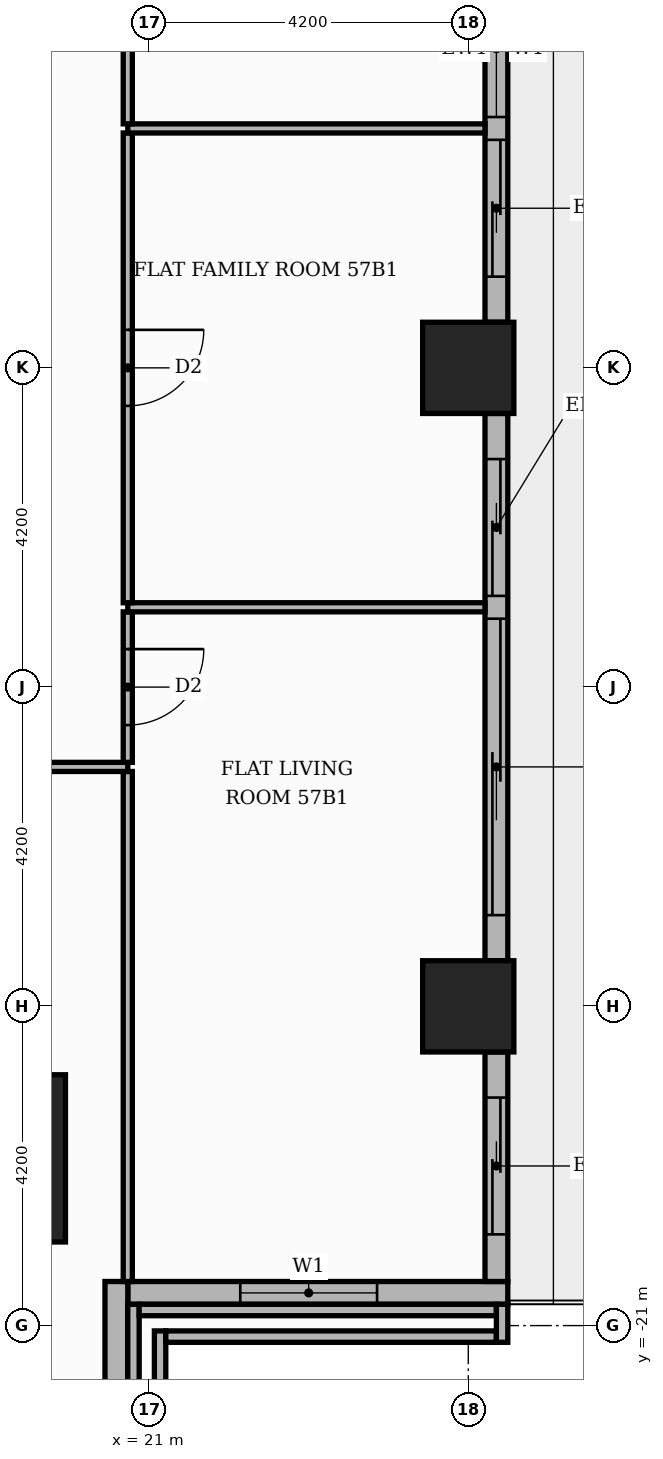
"""IFC4 building model, lengths in metres.
Left out: names, types, materials, properties, quantities, classifications, styles, units other than length and angle.
Written with IfcOpenShell. Run it as: python <this file> out.ifc"""

import sys

from ifc_helpers import new_model, si_unit, direction, frame, frame_2d, origin, origin_2d, place, context, subcontext, project, spatial, rectangle, extrude, element, fill, save


model = new_model("IFC4")
c1 = context("Model", 3, precision=1e-05, world=origin(), true_north=direction((0.0, 1.0)))
c2 = subcontext(c1, "Body", "Model", "MODEL_VIEW")
j1 = project(units=[si_unit("LENGTHUNIT", "METRE"), si_unit("PLANEANGLEUNIT", "RADIAN")], contexts=[c1])
p1 = place(None, origin())
s1 = spatial("IfcSite", under=j1, at=p1, CompositionType="ELEMENT")
p2 = place(p1, origin())
s2 = spatial("IfcBuilding", under=s1, at=p2, CompositionType="ELEMENT")
p3 = place(p2, frame((0.0, 0.0, 240.6)))
s3 = spatial("IfcBuildingStorey", under=s2, at=p3, CompositionType="ELEMENT", Elevation=240.6)
p4 = place(p3, frame((18.8, -18.8, 0.0), z_axis=(0.0, 0.0, 1.0), x_axis=(1.0, 0.0, 0.0)))
e1 = element("IfcColumn", 1, at=p4, inside=s3, PredefinedType="COLUMN", context=c2, shape_type="SweptSolid", body=[
    extrude(rectangle(XDim=2.2, YDim=2.2, at=origin_2d()), origin(), (0.0, 0.0, 1.0), 3.9),
])
p5 = place(p3, frame((25.2, -8.4, -0.42), z_axis=(0.0, 0.0, 1.0), x_axis=(1.0, 0.0, 0.0)))
e2 = element("IfcColumn", 2, at=p5, inside=s3, PredefinedType="COLUMN", context=c2, shape_type="SweptSolid", body=[
    extrude(rectangle(XDim=1.2, YDim=1.2, at=origin_2d()), origin(), (0.0, 0.0, 1.0), 4.32),
])
p6 = place(p3, frame((25.2, -16.8, 0.0), z_axis=(0.0, 0.0, 1.0), x_axis=(1.0, 0.0, 0.0)))
e3 = element("IfcColumn", 3, at=p6, inside=s3, PredefinedType="COLUMN", context=c2, shape_type="SweptSolid", body=[
    extrude(rectangle(XDim=1.2, YDim=1.2, at=origin_2d()), origin(), (0.0, 0.0, 1.0), 3.9),
])
p7 = place(p3, frame((20.72, -20.57, 0.0), z_axis=(0.0, 0.0, 1.0), x_axis=(1.0, 0.0, 0.0)))
e4 = element("IfcWall", 4, at=p7, inside=s3, PredefinedType="STANDARD", context=c2, shape_type="SweptSolid", body=[
    extrude(rectangle(XDim=5.0, YDim=0.3, at=frame_2d((2.5, 0.0))), origin(), (0.0, 0.0, 1.0), 3.48),
])
p8 = place(p7, frame((1.48, 0.0, 0.9)))
e5 = element("IfcOpeningElement", 5, at=p8, cuts=e4, PredefinedType="OPENING", context=c2, shape_type="SweptSolid", body=[
    extrude(rectangle(XDim=1.8, YDim=2.1, at=frame_2d((0.9, 1.05))), frame((0.0, 0.16, 0.0), z_axis=(0.0, -1.0, 0.0), x_axis=(1.0, 0.0, 0.0)), (0.0, 0.0, 1.0), 0.32),
])
p9 = place(p3, frame((25.57, -20.42, 0.0), z_axis=(0.0, 0.0, 1.0), x_axis=(0.0, 1.0, 0.0)))
e6 = element("IfcWall", 6, at=p9, inside=s3, PredefinedType="STANDARD", context=c2, shape_type="SweptSolid", body=[
    extrude(rectangle(XDim=3.02, YDim=0.3, at=frame_2d((1.51, 0.0))), origin(), (0.0, 0.0, 1.0), 3.48),
])
p10 = place(p9, frame((0.62, 0.0, 0.0)))
e7 = element("IfcOpeningElement", 7, at=p10, cuts=e6, PredefinedType="OPENING", context=c2, shape_type="SweptSolid", body=[
    extrude(rectangle(XDim=1.8, YDim=2.4, at=frame_2d((0.9, 1.2))), frame((0.0, 0.16, 0.0), z_axis=(0.0, -1.0, 0.0), x_axis=(1.0, 0.0, 0.0)), (0.0, 0.0, 1.0), 0.32),
])
p11 = place(p3, frame((25.57, -16.2, 0.0), z_axis=(0.0, 0.0, 1.0), x_axis=(0.0, 1.0, 0.0)))
e8 = element("IfcWall", 8, at=p11, inside=s3, PredefinedType="STANDARD", context=c2, shape_type="SweptSolid", body=[
    extrude(rectangle(XDim=7.2, YDim=0.3, at=frame_2d((3.6, 0.0))), origin(), (0.0, 0.0, 1.0), 3.48),
])
p12 = place(p11, frame((0.6, 0.0, 0.0)))
e9 = element("IfcOpeningElement", 9, at=p12, cuts=e8, PredefinedType="OPENING", context=c2, shape_type="SweptSolid", body=[
    extrude(rectangle(XDim=3.9, YDim=2.4, at=frame_2d((1.95, 1.2))), frame((0.0, 0.16, 0.0), z_axis=(0.0, -1.0, 0.0), x_axis=(1.0, 0.0, 0.0)), (0.0, 0.0, 1.0), 0.32),
])
p13 = place(p11, frame((4.8, 0.0, 0.0)))
e10 = element("IfcOpeningElement", 10, at=p13, cuts=e8, PredefinedType="OPENING", context=c2, shape_type="SweptSolid", body=[
    extrude(rectangle(XDim=1.8, YDim=2.4, at=frame_2d((0.9, 1.2))), frame((0.0, 0.16, 0.0), z_axis=(0.0, -1.0, 0.0), x_axis=(1.0, 0.0, 0.0)), (0.0, 0.0, 1.0), 0.32),
])
p14 = place(p3, frame((25.57, -7.8, 0.0), z_axis=(0.0, 0.0, 1.0), x_axis=(0.0, 1.0, 0.0)))
e11 = element("IfcWall", 11, at=p14, inside=s3, PredefinedType="STANDARD", context=c2, shape_type="SweptSolid", body=[
    extrude(rectangle(XDim=7.2, YDim=0.3, at=frame_2d((3.6, 0.0))), origin(), (0.0, 0.0, 1.0), 3.48),
])
p15 = place(p14, frame((0.6, 0.0, 0.0)))
e12 = element("IfcOpeningElement", 12, at=p15, cuts=e11, PredefinedType="OPENING", context=c2, shape_type="SweptSolid", body=[
    extrude(rectangle(XDim=1.8, YDim=2.4, at=frame_2d((0.9, 1.2))), frame((0.0, 0.16, 0.0), z_axis=(0.0, -1.0, 0.0), x_axis=(1.0, 0.0, 0.0)), (0.0, 0.0, 1.0), 0.32),
])
p16 = place(p14, frame((2.7, 0.0, 0.9)))
e13 = element("IfcOpeningElement", 13, at=p16, cuts=e11, PredefinedType="OPENING", context=c2, shape_type="SweptSolid", body=[
    extrude(rectangle(XDim=1.8, YDim=2.1, at=frame_2d((0.9, 1.05))), frame((0.0, 0.16, 0.0), z_axis=(0.0, -1.0, 0.0), x_axis=(1.0, 0.0, 0.0)), (0.0, 0.0, 1.0), 0.32),
])
p17 = place(p14, frame((4.8, 0.0, 0.0)))
e14 = element("IfcOpeningElement", 14, at=p17, cuts=e11, PredefinedType="OPENING", context=c2, shape_type="SweptSolid", body=[
    extrude(rectangle(XDim=1.8, YDim=2.4, at=frame_2d((0.9, 1.2))), frame((0.0, 0.16, 0.0), z_axis=(0.0, -1.0, 0.0), x_axis=(1.0, 0.0, 0.0)), (0.0, 0.0, 1.0), 0.32),
])
p18 = place(p3, frame((20.57, -25.42, 0.0), z_axis=(0.0, 0.0, 1.0), x_axis=(0.0, 1.0, 0.0)))
e15 = element("IfcWall", 15, at=p18, inside=s3, PredefinedType="STANDARD", context=c2, shape_type="SweptSolid", body=[
    extrude(rectangle(XDim=5.0, YDim=0.3, at=frame_2d((2.5, 0.0))), origin(), (0.0, 0.0, 1.0), 3.48),
])
p19 = place(p18, frame((1.42, 0.0, 0.9)))
e16 = element("IfcOpeningElement", 16, at=p19, cuts=e15, PredefinedType="OPENING", context=c2, shape_type="SweptSolid", body=[
    extrude(rectangle(XDim=1.8, YDim=2.1, at=frame_2d((0.9, 1.05))), frame((0.0, 0.16, 0.0), z_axis=(0.0, -1.0, 0.0), x_axis=(1.0, 0.0, 0.0)), (0.0, 0.0, 1.0), 0.32),
])
p20 = place(p3, frame((20.795, -25.72, 0.0), z_axis=(0.0, 0.0, 1.0), x_axis=(0.0, 1.0, 0.0)))
e17 = element("IfcWall", 17, at=p20, inside=s3, PredefinedType="PARAPET", context=c2, shape_type="SweptSolid", body=[
    extrude(rectangle(XDim=5.0, YDim=0.15, at=frame_2d((2.5, 0.0))), origin(), (0.0, 0.0, 1.0), 1.1),
])
p21 = place(p3, frame((20.87, -20.795, 0.0), z_axis=(0.0, 0.0, 1.0), x_axis=(1.0, 0.0, 0.0)))
e18 = element("IfcWall", 18, at=p21, inside=s3, PredefinedType="PARAPET", context=c2, shape_type="SweptSolid", body=[
    extrude(rectangle(XDim=4.7, YDim=0.15, at=frame_2d((2.35, 0.0))), origin(), (0.0, 0.0, 1.0), 1.1),
])
p22 = place(p3, frame((21.145, -25.72, 0.0), z_axis=(0.0, 0.0, 1.0), x_axis=(0.0, 1.0, 0.0)))
e19 = element("IfcWall", 19, at=p22, inside=s3, PredefinedType="PARAPET", context=c2, shape_type="SweptSolid", body=[
    extrude(rectangle(XDim=4.65, YDim=0.15, at=frame_2d((2.325, 0.0))), origin(), (0.0, 0.0, 1.0), 1.1),
])
p23 = place(p3, frame((21.22, -21.145, 0.0), z_axis=(0.0, 0.0, 1.0), x_axis=(1.0, 0.0, 0.0)))
e20 = element("IfcWall", 20, at=p23, inside=s3, PredefinedType="PARAPET", context=c2, shape_type="SweptSolid", body=[
    extrude(rectangle(XDim=4.35, YDim=0.15, at=frame_2d((2.175, 0.0))), origin(), (0.0, 0.0, 1.0), 1.1),
])
p24 = place(p3, frame((25.645, -21.22, 0.0), z_axis=(0.0, 0.0, 1.0), x_axis=(0.0, 1.0, 0.0)))
e21 = element("IfcWall", 21, at=p24, inside=s3, PredefinedType="PARAPET", context=c2, shape_type="SweptSolid", body=[
    extrude(rectangle(XDim=0.5, YDim=0.15, at=frame_2d((0.25, 0.0))), origin(), (0.0, 0.0, 1.0), 1.1),
])
p25 = place(p3, frame((20.72, -20.42, 0.0), z_axis=(0.0, 0.0, 1.0), x_axis=(0.0, 1.0, 0.0)))
e22 = element("IfcWall", 22, at=p25, inside=s3, PredefinedType="PARTITIONING", context=c2, shape_type="SweptSolid", body=[
    extrude(rectangle(XDim=6.71, YDim=0.12, at=frame_2d((3.355, 0.0))), origin(), (0.0, 0.0, 1.0), 3.48),
])
p26 = place(p3, frame((13.65, -13.65, 0.0), z_axis=(0.0, 0.0, 1.0), x_axis=(1.0, 0.0, 0.0)))
e23 = element("IfcWall", 23, at=p26, inside=s3, PredefinedType="PARTITIONING", context=c2, shape_type="SweptSolid", body=[
    extrude(rectangle(XDim=7.07, YDim=0.12, at=frame_2d((3.535, 0.0))), origin(), (0.0, 0.0, 1.0), 3.48),
])
p27 = place(p26, frame((3.085, 0.0, 0.0)))
e24 = element("IfcOpeningElement", 24, at=p27, cuts=e23, PredefinedType="OPENING", context=c2, shape_type="SweptSolid", body=[
    extrude(rectangle(XDim=0.9, YDim=2.1, at=frame_2d((0.45, 1.05))), frame((0.0, 0.07, 0.0), z_axis=(0.0, -1.0, 0.0), x_axis=(1.0, 0.0, 0.0)), (0.0, 0.0, 1.0), 0.14),
])
p28 = place(p3, frame((20.72, -13.59, 0.0), z_axis=(0.0, 0.0, 1.0), x_axis=(0.0, 1.0, 0.0)))
e25 = element("IfcWall", 25, at=p28, inside=s3, PredefinedType="PARTITIONING", context=c2, shape_type="SweptSolid", body=[
    extrude(rectangle(XDim=1.98, YDim=0.12, at=frame_2d((0.99, 0.0))), origin(), (0.0, 0.0, 1.0), 3.48),
])
p29 = place(p28, frame((0.49, 0.0, 0.0)))
e26 = element("IfcOpeningElement", 26, at=p29, cuts=e25, PredefinedType="OPENING", context=c2, shape_type="SweptSolid", body=[
    extrude(rectangle(XDim=1.0, YDim=2.1, at=frame_2d((0.5, 1.05))), frame((0.0, 0.07, 0.0), z_axis=(0.0, -1.0, 0.0), x_axis=(1.0, 0.0, 0.0)), (0.0, 0.0, 1.0), 0.14),
])
p30 = place(p3, frame((20.72, -11.55, 0.0), z_axis=(0.0, 0.0, 1.0), x_axis=(1.0, 0.0, 0.0)))
e27 = element("IfcWall", 27, at=p30, inside=s3, PredefinedType="PARTITIONING", context=c2, shape_type="SweptSolid", body=[
    extrude(rectangle(XDim=4.7, YDim=0.12, at=frame_2d((2.35, 0.0))), origin(), (0.0, 0.0, 1.0), 3.48),
])
p31 = place(p3, frame((20.72, -11.49, 0.0), z_axis=(0.0, 0.0, 1.0), x_axis=(0.0, 1.0, 0.0)))
e28 = element("IfcWall", 28, at=p31, inside=s3, PredefinedType="PARTITIONING", context=c2, shape_type="SweptSolid", body=[
    extrude(rectangle(XDim=6.18, YDim=0.12, at=frame_2d((3.09, 0.0))), origin(), (0.0, 0.0, 1.0), 3.48),
])
p32 = place(p31, frame((2.59, 0.0, 0.0)))
e29 = element("IfcOpeningElement", 29, at=p32, cuts=e28, PredefinedType="OPENING", context=c2, shape_type="SweptSolid", body=[
    extrude(rectangle(XDim=1.0, YDim=2.1, at=frame_2d((0.5, 1.05))), frame((0.0, 0.07, 0.0), z_axis=(0.0, -1.0, 0.0), x_axis=(1.0, 0.0, 0.0)), (0.0, 0.0, 1.0), 0.14),
])
p33 = place(p3, frame((20.72, -5.25, 0.0), z_axis=(0.0, 0.0, 1.0), x_axis=(1.0, 0.0, 0.0)))
e30 = element("IfcWall", 30, at=p33, inside=s3, PredefinedType="PARTITIONING", context=c2, shape_type="SweptSolid", body=[
    extrude(rectangle(XDim=4.7, YDim=0.12, at=frame_2d((2.35, 0.0))), origin(), (0.0, 0.0, 1.0), 3.48),
])
p34 = place(p3, frame((20.72, -5.19, 0.0), z_axis=(0.0, 0.0, 1.0), x_axis=(0.0, 1.0, 0.0)))
e31 = element("IfcWall", 31, at=p34, inside=s3, PredefinedType="PARTITIONING", context=c2, shape_type="SweptSolid", body=[
    extrude(rectangle(XDim=8.28, YDim=0.12, at=frame_2d((4.14, 0.0))), origin(), (0.0, 0.0, 1.0), 3.48),
])
p35 = place(p34, frame((3.69, 0.0, 0.0)))
e32 = element("IfcOpeningElement", 32, at=p35, cuts=e31, PredefinedType="OPENING", context=c2, shape_type="SweptSolid", body=[
    extrude(rectangle(XDim=0.9, YDim=2.1, at=frame_2d((0.45, 1.05))), frame((0.0, 0.07, 0.0), z_axis=(0.0, -1.0, 0.0), x_axis=(1.0, 0.0, 0.0)), (0.0, 0.0, 1.0), 0.14),
])
p36 = place(p8, origin())
e33 = element("IfcWindow", 33, at=p36, inside=s3, PartitioningType="SINGLE_PANEL", PredefinedType="WINDOW", context=c2, shape_type="SweptSolid", body=[
    extrude(rectangle(XDim=1.8, YDim=2.1, at=frame_2d((0.9, 1.05))), frame((0.0, 0.03, 0.0), z_axis=(0.0, -1.0, 0.0), x_axis=(1.0, 0.0, 0.0)), (0.0, 0.0, 1.0), 0.06),
])
fill(e5, e33)
p37 = place(p10, origin())
e34 = element("IfcDoor", 34, at=p37, inside=s3, OperationType="SLIDING_TO_RIGHT", PredefinedType="DOOR", context=c2, shape_type="SweptSolid", body=[
    extrude(rectangle(XDim=1.8, YDim=2.4, at=frame_2d((0.9, 1.2))), frame((0.0, 0.025, 0.0), z_axis=(0.0, -1.0, 0.0), x_axis=(1.0, 0.0, 0.0)), (0.0, 0.0, 1.0), 0.05),
])
fill(e7, e34)
p38 = place(p12, origin())
e35 = element("IfcDoor", 35, at=p38, inside=s3, OperationType="SLIDING_TO_LEFT", PredefinedType="DOOR", context=c2, shape_type="SweptSolid", body=[
    extrude(rectangle(XDim=3.9, YDim=2.4, at=frame_2d((1.95, 1.2))), frame((0.0, 0.025, 0.0), z_axis=(0.0, -1.0, 0.0), x_axis=(1.0, 0.0, 0.0)), (0.0, 0.0, 1.0), 0.05),
])
fill(e9, e35)
p39 = place(p13, origin())
e36 = element("IfcDoor", 36, at=p39, inside=s3, OperationType="SLIDING_TO_RIGHT", PredefinedType="DOOR", context=c2, shape_type="SweptSolid", body=[
    extrude(rectangle(XDim=1.8, YDim=2.4, at=frame_2d((0.9, 1.2))), frame((0.0, 0.025, 0.0), z_axis=(0.0, -1.0, 0.0), x_axis=(1.0, 0.0, 0.0)), (0.0, 0.0, 1.0), 0.05),
])
fill(e10, e36)
p40 = place(p15, origin())
e37 = element("IfcDoor", 37, at=p40, inside=s3, OperationType="SLIDING_TO_LEFT", PredefinedType="DOOR", context=c2, shape_type="SweptSolid", body=[
    extrude(rectangle(XDim=1.8, YDim=2.4, at=frame_2d((0.9, 1.2))), frame((0.0, 0.025, 0.0), z_axis=(0.0, -1.0, 0.0), x_axis=(1.0, 0.0, 0.0)), (0.0, 0.0, 1.0), 0.05),
])
fill(e12, e37)
p41 = place(p16, origin())
e38 = element("IfcWindow", 38, at=p41, inside=s3, PartitioningType="SINGLE_PANEL", PredefinedType="WINDOW", context=c2, shape_type="SweptSolid", body=[
    extrude(rectangle(XDim=1.8, YDim=2.1, at=frame_2d((0.9, 1.05))), frame((0.0, 0.03, 0.0), z_axis=(0.0, -1.0, 0.0), x_axis=(1.0, 0.0, 0.0)), (0.0, 0.0, 1.0), 0.06),
])
fill(e13, e38)
p42 = place(p29, frame((1.0, 0.0, 0.0), z_axis=(0.0, 0.0, 1.0), x_axis=(-1.0, 0.0, 0.0)))
e39 = element("IfcDoor", 39, at=p42, inside=s3, OperationType="SINGLE_SWING_RIGHT", PredefinedType="DOOR", context=c2, shape_type="SweptSolid", body=[
    extrude(rectangle(XDim=1.0, YDim=2.1, at=frame_2d((0.5, 1.05))), frame((0.0, 0.025, 0.0), z_axis=(0.0, -1.0, 0.0), x_axis=(1.0, 0.0, 0.0)), (0.0, 0.0, 1.0), 0.05),
])
fill(e26, e39)
p43 = place(p32, frame((1.0, 0.0, 0.0), z_axis=(0.0, 0.0, 1.0), x_axis=(-1.0, 0.0, 0.0)))
e40 = element("IfcDoor", 40, at=p43, inside=s3, OperationType="SINGLE_SWING_RIGHT", PredefinedType="DOOR", context=c2, shape_type="SweptSolid", body=[
    extrude(rectangle(XDim=1.0, YDim=2.1, at=frame_2d((0.5, 1.05))), frame((0.0, 0.025, 0.0), z_axis=(0.0, -1.0, 0.0), x_axis=(1.0, 0.0, 0.0)), (0.0, 0.0, 1.0), 0.05),
])
fill(e29, e40)
save(model, sys.argv[1])
